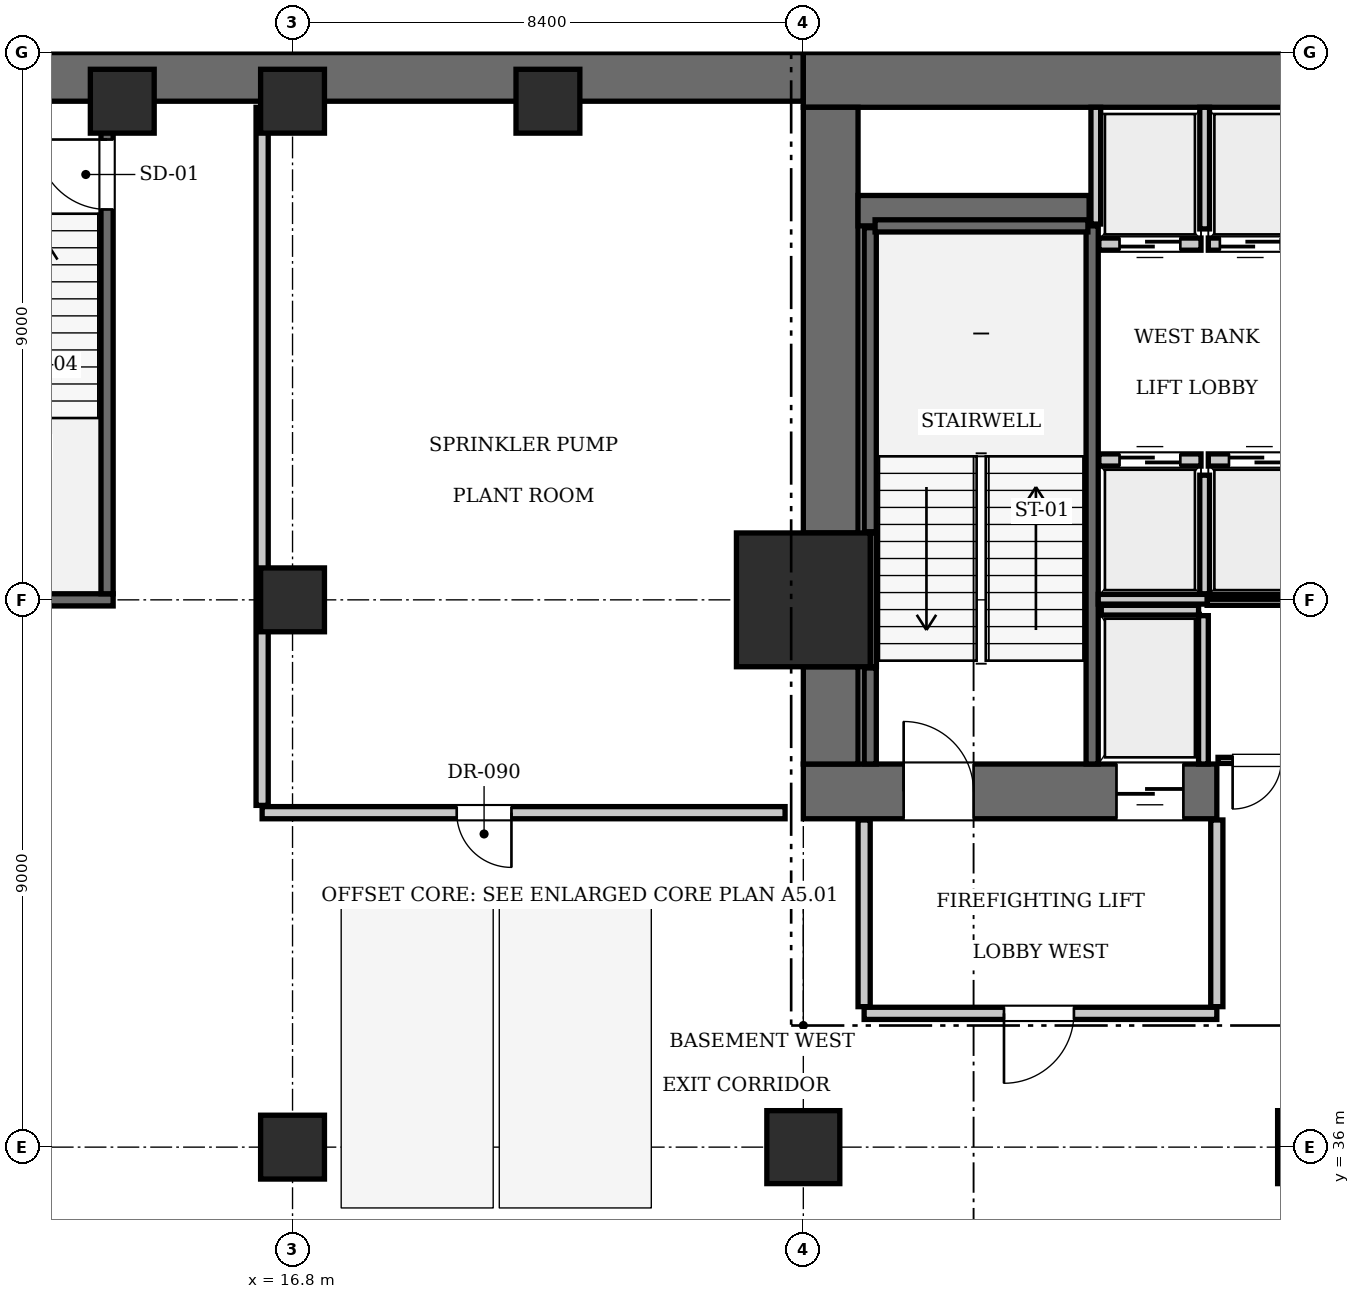
"""IFC4 building model, lengths in metres.
Left out: names, types, materials, properties, quantities, classifications, styles, units other than length and angle.
Written with IfcOpenShell. Run it as: python <this file> out.ifc"""

import sys

from ifc_helpers import new_model, si_unit, direction, frame, frame_2d, origin, origin_2d, place, context, subcontext, project, spatial, rectangle, extrude, element, fill, save


model = new_model("IFC4")
c1 = context("Model", 3, precision=1e-05, world=origin(), true_north=direction((0.0, 1.0)))
c2 = subcontext(c1, "Body", "Model", "MODEL_VIEW")
j1 = project(units=[si_unit("LENGTHUNIT", "METRE"), si_unit("PLANEANGLEUNIT", "RADIAN")], contexts=[c1])
p1 = place(None, origin())
s1 = spatial("IfcSite", under=j1, at=p1, CompositionType="ELEMENT")
p2 = place(p1, origin())
s2 = spatial("IfcBuilding", under=s1, at=p2, CompositionType="ELEMENT")
p3 = place(p2, frame((0.0, 0.0, -9.8)))
s3 = spatial("IfcBuildingStorey", under=s2, at=p3, CompositionType="ELEMENT", Elevation=-9.8)
p4 = place(p3, frame((0.0, 53.6, 0.0), z_axis=(0.0, 0.0, 1.0), x_axis=(1.0, 0.0, 0.0)))
e1 = element("IfcWall", 1, at=p4, inside=s3, PredefinedType="USERDEFINED", context=c2, shape_type="SweptSolid", body=[
    extrude(rectangle(XDim=25.2, YDim=0.8, at=frame_2d((12.6, 0.0))), origin(), (0.0, 0.0, 1.0), 4.55),
])
p5 = place(p3, frame((25.2, 45.0, -0.4), z_axis=(0.0, 0.0, 1.0), x_axis=(1.0, 0.0, 0.0)))
e2 = element("IfcColumn", 2, at=p5, inside=s3, PredefinedType="COLUMN", context=c2, shape_type="SweptSolid", body=[
    extrude(rectangle(XDim=2.2, YDim=2.2, at=origin_2d()), origin(), (0.0, 0.0, 1.0), 4.95),
])
p6 = place(p3, frame((25.2, 53.55, 0.0), z_axis=(0.0, 0.0, 1.0), x_axis=(1.0, 0.0, 0.0)))
e3 = element("IfcWall", 3, at=p6, inside=s3, PredefinedType="SHEAR", context=c2, shape_type="SweptSolid", body=[
    extrude(rectangle(XDim=25.2, YDim=0.9, at=frame_2d((12.6, 0.0))), origin(), (0.0, 0.0, 1.0), 4.55),
])
p7 = place(p3, frame((25.2, 41.85, 0.0), z_axis=(0.0, 0.0, 1.0), x_axis=(1.0, 0.0, 0.0)))
e4 = element("IfcWall", 4, at=p7, inside=s3, PredefinedType="SHEAR", context=c2, shape_type="SweptSolid", body=[
    extrude(rectangle(XDim=6.8, YDim=0.9, at=frame_2d((3.4, 0.0))), origin(), (0.0, 0.0, 1.0), 4.55),
])
p8 = place(p7, frame((1.65, 0.0, 0.0)))
e5 = element("IfcOpeningElement", 5, at=p8, cuts=e4, PredefinedType="OPENING", context=c2, shape_type="SweptSolid", body=[
    extrude(rectangle(XDim=1.15, YDim=2.15, at=frame_2d((0.575, 1.075))), frame((0.0, 0.46, 0.0), z_axis=(0.0, -1.0, 0.0), x_axis=(1.0, 0.0, 0.0)), (0.0, 0.0, 1.0), 0.92),
])
p9 = place(p7, frame((5.15, 0.0, 0.0)))
e6 = element("IfcOpeningElement", 6, at=p9, cuts=e4, PredefinedType="OPENING", context=c2, shape_type="SweptSolid", body=[
    extrude(rectangle(XDim=1.1, YDim=2.2, at=frame_2d((0.55, 1.1))), frame((0.0, 0.46, 0.0), z_axis=(0.0, -1.0, 0.0), x_axis=(1.0, 0.0, 0.0)), (0.0, 0.0, 1.0), 0.92),
])
p10 = place(p3, frame((25.65, 42.3, 0.0), z_axis=(0.0, 0.0, 1.0), x_axis=(0.0, 1.0, 0.0)))
e7 = element("IfcWall", 7, at=p10, inside=s3, PredefinedType="SHEAR", context=c2, shape_type="SweptSolid", body=[
    extrude(rectangle(XDim=1.6, YDim=0.9, at=frame_2d((0.8, 0.0))), origin(), (0.0, 0.0, 1.0), 4.55),
])
p11 = place(p3, frame((25.65, 46.1, 0.0), z_axis=(0.0, 0.0, 1.0), x_axis=(0.0, 1.0, 0.0)))
e8 = element("IfcWall", 8, at=p11, inside=s3, PredefinedType="SHEAR", context=c2, shape_type="SweptSolid", body=[
    extrude(rectangle(XDim=7.0, YDim=0.9, at=frame_2d((3.5, 0.0))), origin(), (0.0, 0.0, 1.0), 4.55),
])
p12 = place(p3, frame((26.1, 51.4, 0.0), z_axis=(0.0, 0.0, 1.0), x_axis=(1.0, 0.0, 0.0)))
e9 = element("IfcWall", 9, at=p12, inside=s3, PredefinedType="SHEAR", context=c2, shape_type="SweptSolid", body=[
    extrude(rectangle(XDim=3.8, YDim=0.5, at=frame_2d((1.9, 0.0))), origin(), (0.0, 0.0, 1.0), 4.55),
])
for number, where, z_axis, x_axis in (
    (10, (25.2, 36.0, -0.4), (0.0, 0.0, 1.0), (1.0, 0.0, 0.0)),
    (11, (33.6, 36.0, -0.4), (0.0, 0.0, 1.0), (1.0, 0.0, 0.0)),
):
    element("IfcColumn", number, at=place(p3, frame(where, z_axis=z_axis, x_axis=x_axis)), inside=s3, PredefinedType="COLUMN", context=c2, shape_type="SweptSolid", body=[
        extrude(rectangle(XDim=1.2, YDim=1.2, at=origin_2d()), origin(), (0.0, 0.0, 1.0), 4.95),
    ])
for number, where, z_axis, x_axis in (
    (12, (16.8, 36.0, -0.4), (0.0, 0.0, 1.0), (1.0, 0.0, 0.0)),
    (13, (16.8, 45.0, -0.4), (0.0, 0.0, 1.0), (1.0, 0.0, 0.0)),
    (14, (16.8, 53.2, -0.4), (0.0, 0.0, 1.0), (1.0, 0.0, 0.0)),
    (15, (14.0, 53.2, -0.4), (0.0, 0.0, 1.0), (1.0, 0.0, 0.0)),
    (16, (21.0, 53.2, -0.4), (0.0, 0.0, 1.0), (1.0, 0.0, 0.0)),
):
    element("IfcColumn", number, at=place(p3, frame(where, z_axis=z_axis, x_axis=x_axis)), inside=s3, PredefinedType="COLUMN", context=c2, shape_type="SweptSolid", body=[
        extrude(rectangle(XDim=1.05, YDim=1.05, at=origin_2d()), origin(), (0.0, 0.0, 1.0), 4.95),
    ])
p13 = place(p3, frame((29.95, 42.3, 0.0), z_axis=(0.0, 0.0, 1.0), x_axis=(0.0, 1.0, 0.0)))
e17 = element("IfcWall", 17, at=p13, inside=s3, PredefinedType="SOLIDWALL", context=c2, shape_type="SweptSolid", body=[
    extrude(rectangle(XDim=8.85, YDim=0.2, at=frame_2d((4.425, 0.0))), origin(), (0.0, 0.0, 1.0), 4.2),
])
p14 = place(p3, frame((26.3, 42.3, 0.0), z_axis=(0.0, 0.0, 1.0), x_axis=(0.0, 1.0, 0.0)))
e18 = element("IfcWall", 18, at=p14, inside=s3, PredefinedType="SOLIDWALL", context=c2, shape_type="SweptSolid", body=[
    extrude(rectangle(XDim=1.58, YDim=0.2, at=frame_2d((0.79, 0.0))), origin(), (0.0, 0.0, 1.0), 4.2),
])
p15 = place(p3, frame((26.3, 46.12, 0.0), z_axis=(0.0, 0.0, 1.0), x_axis=(0.0, 1.0, 0.0)))
e19 = element("IfcWall", 19, at=p15, inside=s3, PredefinedType="SOLIDWALL", context=c2, shape_type="SweptSolid", body=[
    extrude(rectangle(XDim=5.0, YDim=0.2, at=frame_2d((2.5, 0.0))), origin(), (0.0, 0.0, 1.0), 4.2),
])
p16 = place(p3, frame((26.38, 51.15, 0.0), z_axis=(0.0, 0.0, 1.0), x_axis=(1.0, 0.0, 0.0)))
e20 = element("IfcWall", 20, at=p16, inside=s3, PredefinedType="SOLIDWALL", context=c2, shape_type="SweptSolid", body=[
    extrude(rectangle(XDim=3.5, YDim=0.2, at=frame_2d((1.75, 0.0))), origin(), (0.0, 0.0, 1.0), 4.2),
])
p17 = place(p3, frame((26.352, 43.9, 0.0), z_axis=(0.0, 0.0, 1.0), x_axis=(0.0, 1.0, 0.0)))
e21 = element("IfcWall", 21, at=p17, inside=s3, PredefinedType="SOLIDWALL", context=c2, shape_type="SweptSolid", body=[
    extrude(rectangle(XDim=2.2, YDim=0.1, at=frame_2d((1.1, 0.0))), origin(), (0.0, 0.0, 1.0), 4.2),
])
p18 = place(p3, frame((9.8, 45.0, 0.0), z_axis=(0.0, 0.0, 1.0), x_axis=(1.0, 0.0, 0.0)))
e22 = element("IfcWall", 22, at=p18, inside=s3, PredefinedType="SOLIDWALL", context=c2, shape_type="SweptSolid", body=[
    extrude(rectangle(XDim=4.05, YDim=0.2, at=frame_2d((2.025, 0.0))), origin(), (0.0, 0.0, 1.0), 3.565),
])
p19 = place(p3, frame((13.75, 45.1, 0.0), z_axis=(0.0, 0.0, 1.0), x_axis=(0.0, 1.0, 0.0)))
e23 = element("IfcWall", 23, at=p19, inside=s3, PredefinedType="SOLIDWALL", context=c2, shape_type="SweptSolid", body=[
    extrude(rectangle(XDim=8.1, YDim=0.2, at=frame_2d((4.05, 0.0))), origin(), (0.0, 0.0, 1.0), 4.2),
])
p20 = place(p19, frame((6.32, 0.0, 0.0)))
e24 = element("IfcOpeningElement", 24, at=p20, cuts=e23, PredefinedType="OPENING", context=c2, shape_type="SweptSolid", body=[
    extrude(rectangle(XDim=1.15, YDim=2.15, at=frame_2d((0.575, 1.075))), frame((0.0, 0.11, 0.0), z_axis=(0.0, -1.0, 0.0), x_axis=(1.0, 0.0, 0.0)), (0.0, 0.0, 1.0), 0.22),
])
p21 = place(p3, frame((30.06, 47.3, 0.0), z_axis=(0.0, 0.0, 1.0), x_axis=(1.0, 0.0, 0.0)))
e25 = element("IfcWall", 25, at=p21, inside=s3, PredefinedType="SOLIDWALL", context=c2, shape_type="SweptSolid", body=[
    extrude(rectangle(XDim=1.68, YDim=0.2, at=frame_2d((0.84, 0.0))), origin(), (0.0, 0.0, 1.0), 4.2),
])
p22 = place(p21, frame((0.34, 0.0, 0.0)))
e26 = element("IfcOpeningElement", 26, at=p22, cuts=e25, PredefinedType="OPENING", context=c2, shape_type="SweptSolid", body=[
    extrude(rectangle(XDim=1.0, YDim=2.15, at=frame_2d((0.5, 1.075))), frame((0.0, 0.11, 0.0), z_axis=(0.0, -1.0, 0.0), x_axis=(1.0, 0.0, 0.0)), (0.0, 0.0, 1.0), 0.22),
])
p23 = place(p3, frame((31.86, 47.3, 0.0), z_axis=(0.0, 0.0, 1.0), x_axis=(1.0, 0.0, 0.0)))
e27 = element("IfcWall", 27, at=p23, inside=s3, PredefinedType="SOLIDWALL", context=c2, shape_type="SweptSolid", body=[
    extrude(rectangle(XDim=1.68, YDim=0.2, at=frame_2d((0.84, 0.0))), origin(), (0.0, 0.0, 1.0), 4.2),
])
p24 = place(p23, frame((0.34, 0.0, 0.0)))
e28 = element("IfcOpeningElement", 28, at=p24, cuts=e27, PredefinedType="OPENING", context=c2, shape_type="SweptSolid", body=[
    extrude(rectangle(XDim=1.0, YDim=2.15, at=frame_2d((0.5, 1.075))), frame((0.0, 0.11, 0.0), z_axis=(0.0, -1.0, 0.0), x_axis=(1.0, 0.0, 0.0)), (0.0, 0.0, 1.0), 0.22),
])
p25 = place(p3, frame((30.06, 50.85, 0.0), z_axis=(0.0, 0.0, 1.0), x_axis=(1.0, 0.0, 0.0)))
e29 = element("IfcWall", 29, at=p25, inside=s3, PredefinedType="SOLIDWALL", context=c2, shape_type="SweptSolid", body=[
    extrude(rectangle(XDim=1.68, YDim=0.2, at=frame_2d((0.84, 0.0))), origin(), (0.0, 0.0, 1.0), 4.2),
])
p26 = place(p25, frame((0.34, 0.0, 0.0)))
e30 = element("IfcOpeningElement", 30, at=p26, cuts=e29, PredefinedType="OPENING", context=c2, shape_type="SweptSolid", body=[
    extrude(rectangle(XDim=1.0, YDim=2.15, at=frame_2d((0.5, 1.075))), frame((0.0, 0.11, 0.0), z_axis=(0.0, -1.0, 0.0), x_axis=(1.0, 0.0, 0.0)), (0.0, 0.0, 1.0), 0.22),
])
p27 = place(p3, frame((31.86, 50.85, 0.0), z_axis=(0.0, 0.0, 1.0), x_axis=(1.0, 0.0, 0.0)))
e31 = element("IfcWall", 31, at=p27, inside=s3, PredefinedType="SOLIDWALL", context=c2, shape_type="SweptSolid", body=[
    extrude(rectangle(XDim=1.38, YDim=0.2, at=frame_2d((0.69, 0.0))), origin(), (0.0, 0.0, 1.0), 4.2),
])
p28 = place(p27, frame((0.19, 0.0, 0.0)))
e32 = element("IfcOpeningElement", 32, at=p28, cuts=e31, PredefinedType="OPENING", context=c2, shape_type="SweptSolid", body=[
    extrude(rectangle(XDim=1.0, YDim=2.15, at=frame_2d((0.5, 1.075))), frame((0.0, 0.11, 0.0), z_axis=(0.0, -1.0, 0.0), x_axis=(1.0, 0.0, 0.0)), (0.0, 0.0, 1.0), 0.22),
])
p29 = place(p3, frame((30.1, 44.83, 0.0), z_axis=(0.0, 0.0, 1.0), x_axis=(1.0, 0.0, 0.0)))
e33 = element("IfcWall", 33, at=p29, inside=s3, PredefinedType="SOLIDWALL", context=c2, shape_type="SweptSolid", body=[
    extrude(rectangle(XDim=1.6, YDim=0.16, at=frame_2d((0.8, 0.0))), origin(), (0.0, 0.0, 1.0), 4.2),
])
p30 = place(p3, frame((31.78, 42.3, 0.0), z_axis=(0.0, 0.0, 1.0), x_axis=(0.0, 1.0, 0.0)))
e34 = element("IfcWall", 34, at=p30, inside=s3, PredefinedType="SOLIDWALL", context=c2, shape_type="SweptSolid", body=[
    extrude(rectangle(XDim=2.44, YDim=0.16, at=frame_2d((1.22, 0.0))), origin(), (0.0, 0.0, 1.0), 4.2),
])
p31 = place(p3, frame((31.8, 45.1, 0.0), z_axis=(0.0, 0.0, 1.0), x_axis=(0.0, 1.0, 0.0)))
e35 = element("IfcWall", 35, at=p31, inside=s3, PredefinedType="SOLIDWALL", context=c2, shape_type="SweptSolid", body=[
    extrude(rectangle(XDim=1.95, YDim=0.16, at=frame_2d((0.975, 0.0))), origin(), (0.0, 0.0, 1.0), 4.2),
])
p32 = place(p3, frame((30.05, 45.01, 0.0), z_axis=(0.0, 0.0, 1.0), x_axis=(1.0, 0.0, 0.0)))
e36 = element("IfcWall", 36, at=p32, inside=s3, PredefinedType="SOLIDWALL", context=c2, shape_type="SweptSolid", body=[
    extrude(rectangle(XDim=3.45, YDim=0.16, at=frame_2d((1.725, 0.0))), origin(), (0.0, 0.0, 1.0), 4.2),
])
p33 = place(p3, frame((30.01, 51.18, 0.0), z_axis=(0.0, 0.0, 1.0), x_axis=(0.0, 1.0, 0.0)))
e37 = element("IfcWall", 37, at=p33, inside=s3, PredefinedType="SOLIDWALL", context=c2, shape_type="SweptSolid", body=[
    extrude(rectangle(XDim=1.92, YDim=0.16, at=frame_2d((0.96, 0.0))), origin(), (0.0, 0.0, 1.0), 4.2),
])
p34 = place(p3, frame((31.8, 51.1, 0.0), z_axis=(0.0, 0.0, 1.0), x_axis=(0.0, 1.0, 0.0)))
e38 = element("IfcWall", 38, at=p34, inside=s3, PredefinedType="SOLIDWALL", context=c2, shape_type="SweptSolid", body=[
    extrude(rectangle(XDim=2.0, YDim=0.16, at=frame_2d((1.0, 0.0))), origin(), (0.0, 0.0, 1.0), 4.2),
])
p35 = place(p3, frame((26.2, 38.2, 0.0), z_axis=(0.0, 0.0, 1.0), x_axis=(1.0, 0.0, 0.0)))
e39 = element("IfcWall", 39, at=p35, inside=s3, PredefinedType="PARTITIONING", context=c2, shape_type="SweptSolid", body=[
    extrude(rectangle(XDim=5.8, YDim=0.2, at=frame_2d((2.9, 0.0))), origin(), (0.0, 0.0, 1.0), 4.2),
])
p36 = place(p35, frame((2.3, 0.0, 0.0)))
e40 = element("IfcOpeningElement", 40, at=p36, cuts=e39, PredefinedType="OPENING", context=c2, shape_type="SweptSolid", body=[
    extrude(rectangle(XDim=1.15, YDim=2.15, at=frame_2d((0.575, 1.075))), frame((0.0, 0.11, 0.0), z_axis=(0.0, -1.0, 0.0), x_axis=(1.0, 0.0, 0.0)), (0.0, 0.0, 1.0), 0.22),
])
for number, where, z_axis, x_axis in (
    (41, (26.2, 38.31, 0.0), (0.0, 0.0, 1.0), (0.0, 1.0, 0.0)),
    (42, (32.0, 38.31, 0.0), (0.0, 0.0, 1.0), (0.0, 1.0, 0.0)),
):
    element("IfcWall", number, at=place(p3, frame(where, z_axis=z_axis, x_axis=x_axis)), inside=s3, PredefinedType="PARTITIONING", context=c2, shape_type="SweptSolid", body=[
        extrude(rectangle(XDim=3.07, YDim=0.2, at=frame_2d((1.535, 0.0))), origin(), (0.0, 0.0, 1.0), 4.2),
    ])
p37 = place(p3, frame((32.02, 42.36, 0.0), z_axis=(0.0, 0.0, 1.0), x_axis=(1.0, 0.0, 0.0)))
e43 = element("IfcWall", 43, at=p37, inside=s3, PredefinedType="PARTITIONING", context=c2, shape_type="SweptSolid", body=[
    extrude(rectangle(XDim=1.32, YDim=0.1, at=frame_2d((0.66, 0.0))), origin(), (0.0, 0.0, 1.0), 4.2),
])
p38 = place(p37, frame((0.24, 0.0, 0.0)))
e44 = element("IfcOpeningElement", 44, at=p38, cuts=e43, PredefinedType="OPENING", context=c2, shape_type="SweptSolid", body=[
    extrude(rectangle(XDim=0.8, YDim=2.05, at=frame_2d((0.4, 1.025))), frame((0.0, 0.06, 0.0), z_axis=(0.0, -1.0, 0.0), x_axis=(1.0, 0.0, 0.0)), (0.0, 0.0, 1.0), 0.12),
])
p39 = place(p3, frame((31.84, 44.96, 0.0), z_axis=(0.0, 0.0, 1.0), x_axis=(1.0, 0.0, 0.0)))
e45 = element("IfcWall", 45, at=p39, inside=s3, PredefinedType="PARTITIONING", context=c2, shape_type="SweptSolid", body=[
    extrude(rectangle(XDim=1.48, YDim=0.1, at=frame_2d((0.74, 0.0))), origin(), (0.0, 0.0, 1.0), 4.2),
])
p40 = place(p3, frame((16.3, 41.5, 0.0), z_axis=(0.0, 0.0, 1.0), x_axis=(1.0, 0.0, 0.0)))
e46 = element("IfcWall", 46, at=p40, inside=s3, PredefinedType="PARTITIONING", context=c2, shape_type="SweptSolid", body=[
    extrude(rectangle(XDim=8.6, YDim=0.2, at=frame_2d((4.3, 0.0))), origin(), (0.0, 0.0, 1.0), 4.2),
])
p41 = place(p40, frame((3.2, 0.0, 0.0)))
e47 = element("IfcOpeningElement", 47, at=p41, cuts=e46, PredefinedType="OPENING", context=c2, shape_type="SweptSolid", body=[
    extrude(rectangle(XDim=0.9, YDim=2.1, at=frame_2d((0.45, 1.05))), frame((0.0, 0.11, 0.0), z_axis=(0.0, -1.0, 0.0), x_axis=(1.0, 0.0, 0.0)), (0.0, 0.0, 1.0), 0.22),
])
p42 = place(p3, frame((16.3, 41.62, 0.0), z_axis=(0.0, 0.0, 1.0), x_axis=(0.0, 1.0, 0.0)))
e48 = element("IfcWall", 48, at=p42, inside=s3, PredefinedType="PARTITIONING", context=c2, shape_type="SweptSolid", body=[
    extrude(rectangle(XDim=11.48, YDim=0.2, at=frame_2d((5.74, 0.0))), origin(), (0.0, 0.0, 1.0), 4.2),
])
p43 = place(p8, origin())
e49 = element("IfcDoor", 49, at=p43, inside=s3, OperationType="SINGLE_SWING_LEFT", PredefinedType="DOOR", context=c2, shape_type="SweptSolid", body=[
    extrude(rectangle(XDim=1.15, YDim=2.15, at=frame_2d((0.575, 1.075))), frame((0.0, 0.025, 0.0), z_axis=(0.0, -1.0, 0.0), x_axis=(1.0, 0.0, 0.0)), (0.0, 0.0, 1.0), 0.05),
])
fill(e5, e49)
p44 = place(p20, origin())
e50 = element("IfcDoor", 50, at=p44, inside=s3, OperationType="SINGLE_SWING_RIGHT", PredefinedType="DOOR", context=c2, shape_type="SweptSolid", body=[
    extrude(rectangle(XDim=1.15, YDim=2.15, at=frame_2d((0.575, 1.075))), frame((0.0, 0.025, 0.0), z_axis=(0.0, -1.0, 0.0), x_axis=(1.0, 0.0, 0.0)), (0.0, 0.0, 1.0), 0.05),
])
fill(e24, e50)
p45 = place(p22, origin())
e51 = element("IfcDoor", 51, at=p45, inside=s3, OperationType="SLIDING_TO_LEFT", PredefinedType="DOOR", context=c2, shape_type="SweptSolid", body=[
    extrude(rectangle(XDim=1.0, YDim=2.15, at=frame_2d((0.5, 1.075))), frame((0.0, 0.025, 0.0), z_axis=(0.0, -1.0, 0.0), x_axis=(1.0, 0.0, 0.0)), (0.0, 0.0, 1.0), 0.05),
])
fill(e26, e51)
p46 = place(p24, origin())
e52 = element("IfcDoor", 52, at=p46, inside=s3, OperationType="SLIDING_TO_LEFT", PredefinedType="DOOR", context=c2, shape_type="SweptSolid", body=[
    extrude(rectangle(XDim=1.0, YDim=2.15, at=frame_2d((0.5, 1.075))), frame((0.0, 0.025, 0.0), z_axis=(0.0, -1.0, 0.0), x_axis=(1.0, 0.0, 0.0)), (0.0, 0.0, 1.0), 0.05),
])
fill(e28, e52)
p47 = place(p26, frame((1.0, 0.0, 0.0), z_axis=(0.0, 0.0, 1.0), x_axis=(-1.0, 0.0, 0.0)))
e53 = element("IfcDoor", 53, at=p47, inside=s3, OperationType="SLIDING_TO_LEFT", PredefinedType="DOOR", context=c2, shape_type="SweptSolid", body=[
    extrude(rectangle(XDim=1.0, YDim=2.15, at=frame_2d((0.5, 1.075))), frame((0.0, 0.025, 0.0), z_axis=(0.0, -1.0, 0.0), x_axis=(1.0, 0.0, 0.0)), (0.0, 0.0, 1.0), 0.05),
])
fill(e30, e53)
p48 = place(p28, frame((1.0, 0.0, 0.0), z_axis=(0.0, 0.0, 1.0), x_axis=(-1.0, 0.0, 0.0)))
e54 = element("IfcDoor", 54, at=p48, inside=s3, OperationType="SLIDING_TO_LEFT", PredefinedType="DOOR", context=c2, shape_type="SweptSolid", body=[
    extrude(rectangle(XDim=1.0, YDim=2.15, at=frame_2d((0.5, 1.075))), frame((0.0, 0.025, 0.0), z_axis=(0.0, -1.0, 0.0), x_axis=(1.0, 0.0, 0.0)), (0.0, 0.0, 1.0), 0.05),
])
fill(e32, e54)
p49 = place(p9, frame((1.1, 0.0, 0.0), z_axis=(0.0, 0.0, 1.0), x_axis=(-1.0, 0.0, 0.0)))
e55 = element("IfcDoor", 55, at=p49, inside=s3, OperationType="SLIDING_TO_LEFT", PredefinedType="DOOR", context=c2, shape_type="SweptSolid", body=[
    extrude(rectangle(XDim=1.1, YDim=2.2, at=frame_2d((0.55, 1.1))), frame((0.0, 0.025, 0.0), z_axis=(0.0, -1.0, 0.0), x_axis=(1.0, 0.0, 0.0)), (0.0, 0.0, 1.0), 0.05),
])
fill(e6, e55)
p50 = place(p36, frame((1.15, 0.0, 0.0), z_axis=(0.0, 0.0, 1.0), x_axis=(-1.0, 0.0, 0.0)))
e56 = element("IfcDoor", 56, at=p50, inside=s3, OperationType="SINGLE_SWING_RIGHT", PredefinedType="DOOR", context=c2, shape_type="SweptSolid", body=[
    extrude(rectangle(XDim=1.15, YDim=2.15, at=frame_2d((0.575, 1.075))), frame((0.0, 0.025, 0.0), z_axis=(0.0, -1.0, 0.0), x_axis=(1.0, 0.0, 0.0)), (0.0, 0.0, 1.0), 0.05),
])
fill(e40, e56)
p51 = place(p38, frame((0.8, 0.0, 0.0), z_axis=(0.0, 0.0, 1.0), x_axis=(-1.0, 0.0, 0.0)))
e57 = element("IfcDoor", 57, at=p51, inside=s3, OperationType="SINGLE_SWING_RIGHT", PredefinedType="DOOR", context=c2, shape_type="SweptSolid", body=[
    extrude(rectangle(XDim=0.8, YDim=2.05, at=frame_2d((0.4, 1.025))), frame((0.0, 0.025, 0.0), z_axis=(0.0, -1.0, 0.0), x_axis=(1.0, 0.0, 0.0)), (0.0, 0.0, 1.0), 0.05),
])
fill(e44, e57)
p52 = place(p41, frame((0.9, 0.0, 0.0), z_axis=(0.0, 0.0, 1.0), x_axis=(-1.0, 0.0, 0.0)))
e58 = element("IfcDoor", 58, at=p52, inside=s3, OperationType="SINGLE_SWING_LEFT", PredefinedType="DOOR", context=c2, shape_type="SweptSolid", body=[
    extrude(rectangle(XDim=0.9, YDim=2.1, at=frame_2d((0.45, 1.05))), frame((0.0, 0.025, 0.0), z_axis=(0.0, -1.0, 0.0), x_axis=(1.0, 0.0, 0.0)), (0.0, 0.0, 1.0), 0.05),
])
fill(e47, e58)
save(model, sys.argv[1])
